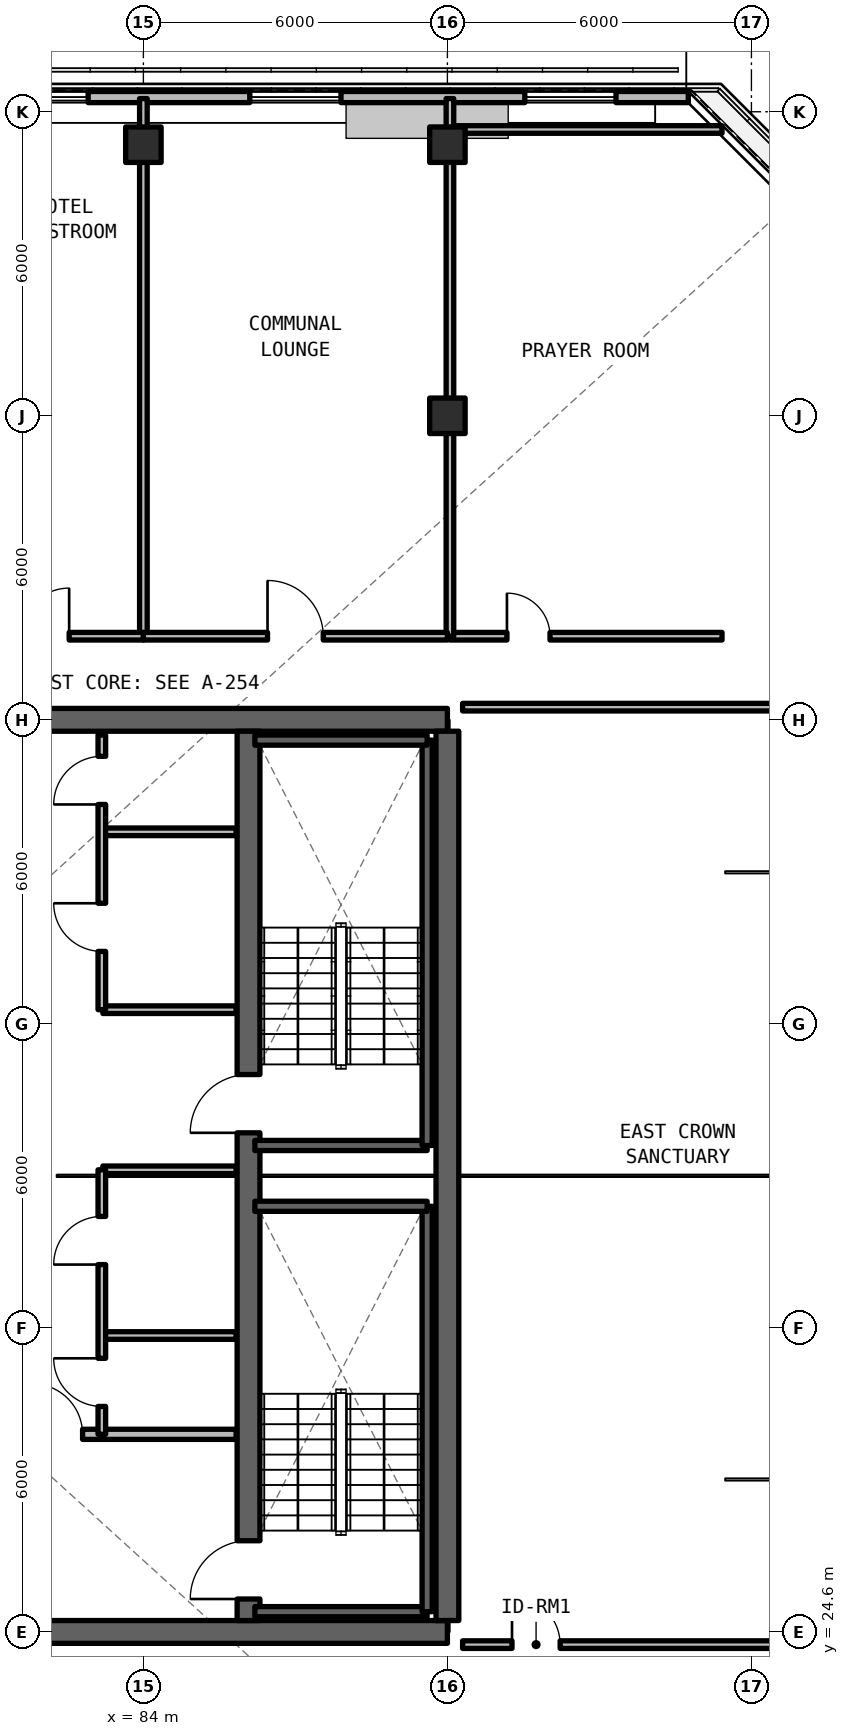
"""IFC4 building model, lengths in metres.
Left out: names, types, materials, properties, quantities, classifications, styles, units other than length and angle.
Written with IfcOpenShell. Run it as: python <this file> out.ifc"""

import sys

from ifc_helpers import new_model, si_unit, direction, frame, frame_2d, origin, origin_2d, place, context, subcontext, project, spatial, rectangle, extrude, element, fill, save


model = new_model("IFC4")
c1 = context("Model", 3, precision=1e-05, world=origin(), true_north=direction((0.0, 1.0)))
c2 = subcontext(c1, "Body", "Model", "MODEL_VIEW")
j1 = project(units=[si_unit("LENGTHUNIT", "METRE"), si_unit("PLANEANGLEUNIT", "RADIAN")], contexts=[c1])
p1 = place(None, origin())
s1 = spatial("IfcSite", under=j1, at=p1, CompositionType="ELEMENT")
p2 = place(p1, origin())
s2 = spatial("IfcBuilding", under=s1, at=p2, CompositionType="ELEMENT")
p3 = place(p2, frame((0.0, 0.0, 229.35)))
s3 = spatial("IfcBuildingStorey", under=s2, at=p3, CompositionType="ELEMENT", Elevation=229.35)
for number, where, z_axis, x_axis in (
    (1, (78.0, 24.6, 0.0), (0.0, 0.0, 1.0), (1.0, 0.0, 0.0)),
    (2, (90.0, 42.6, 0.0), (0.0, 0.0, 1.0), (-1.0, 0.0, 0.0)),
):
    element("IfcWall", number, at=place(p3, frame(where, z_axis=z_axis, x_axis=x_axis)), inside=s3, PredefinedType="SHEAR", context=c2, shape_type="SweptSolid", body=[
        extrude(rectangle(XDim=12.0, YDim=0.45, at=frame_2d((6.0, 0.0))), origin(), (0.0, 0.0, 1.0), 3.3),
    ])
p4 = place(p3, frame((90.0, 24.825, 0.0), z_axis=(0.0, 0.0, 1.0), x_axis=(0.0, 1.0, 0.0)))
e3 = element("IfcWall", 3, at=p4, inside=s3, PredefinedType="SHEAR", context=c2, shape_type="SweptSolid", body=[
    extrude(rectangle(XDim=17.55, YDim=0.45, at=frame_2d((8.775, 0.0))), origin(), (0.0, 0.0, 1.0), 3.3),
])
p5 = place(p3, frame((86.075, 24.825, 0.0), z_axis=(0.0, 0.0, 1.0), x_axis=(0.0, 1.0, 0.0)))
e4 = element("IfcWall", 4, at=p5, inside=s3, PredefinedType="SHEAR", context=c2, shape_type="SweptSolid", body=[
    extrude(rectangle(XDim=17.55, YDim=0.45, at=frame_2d((8.775, 0.0))), origin(), (0.0, 0.0, 1.0), 3.3),
])
p6 = place(p5, frame((0.425, 0.0, 0.0)))
e5 = element("IfcOpeningElement", 5, at=p6, cuts=e4, PredefinedType="OPENING", context=c2, shape_type="SweptSolid", body=[
    extrude(rectangle(XDim=1.15, YDim=2.15, at=frame_2d((0.575, 1.075))), frame((0.0, 0.235, 0.0), z_axis=(0.0, -1.0, 0.0), x_axis=(1.0, 0.0, 0.0)), (0.0, 0.0, 1.0), 0.47),
])
p7 = place(p5, frame((9.625, 0.0, 0.0)))
e6 = element("IfcOpeningElement", 6, at=p7, cuts=e4, PredefinedType="OPENING", context=c2, shape_type="SweptSolid", body=[
    extrude(rectangle(XDim=1.15, YDim=2.15, at=frame_2d((0.575, 1.075))), frame((0.0, 0.235, 0.0), z_axis=(0.0, -1.0, 0.0), x_axis=(1.0, 0.0, 0.0)), (0.0, 0.0, 1.0), 0.47),
])
for number, where, z_axis, x_axis in (
    (7, (90.0, 48.6, 0.0), (0.0, 0.0, 1.0), (1.0, 0.0, 0.0)),
    (8, (84.0, 53.95, 0.0), (0.0, 0.0, 1.0), (1.0, 0.0, 0.0)),
    (9, (90.0, 53.95, 0.0), (0.0, 0.0, 1.0), (1.0, 0.0, 0.0)),
):
    element("IfcColumn", number, at=place(p3, frame(where, z_axis=z_axis, x_axis=x_axis)), inside=s3, PredefinedType="COLUMN", context=c2, shape_type="SweptSolid", body=[
        extrude(rectangle(XDim=0.7, YDim=0.7, at=origin_2d()), origin(), (0.0, 0.0, 1.0), 3.3),
    ])
p8 = place(p3, frame((94.754, 54.89, 0.0), z_axis=(0.0, 0.0, 1.0), x_axis=(-1.0, 0.0, 0.0)))
e10 = element("IfcWall", 10, at=p8, inside=s3, PredefinedType="SOLIDWALL", context=c2, shape_type="SweptSolid", body=[
    extrude(rectangle(XDim=23.609, YDim=0.22, at=frame_2d((11.804, 0.0))), origin(), (0.0, 0.0, 1.0), 3.08),
])
p9 = place(p8, frame((1.427, 0.0, 0.78)))
e11 = element("IfcOpeningElement", 11, at=p9, cuts=e10, PredefinedType="OPENING", context=c2, shape_type="SweptSolid", body=[
    extrude(rectangle(XDim=1.8, YDim=1.66, at=frame_2d((0.9, 0.83))), frame((0.0, 0.12, 0.0), z_axis=(0.0, -1.0, 0.0), x_axis=(1.0, 0.0, 0.0)), (0.0, 0.0, 1.0), 0.24),
])
p10 = place(p8, frame((18.854, 0.0, 0.78)))
e12 = element("IfcOpeningElement", 12, at=p10, cuts=e10, PredefinedType="OPENING", context=c2, shape_type="SweptSolid", body=[
    extrude(rectangle(XDim=1.8, YDim=1.66, at=frame_2d((0.9, 0.83))), frame((0.0, 0.12, 0.0), z_axis=(0.0, -1.0, 0.0), x_axis=(1.0, 0.0, 0.0)), (0.0, 0.0, 1.0), 0.24),
])
p11 = place(p8, frame((15.299, 0.0, 0.78)))
e13 = element("IfcOpeningElement", 13, at=p11, cuts=e10, PredefinedType="OPENING", context=c2, shape_type="SweptSolid", body=[
    extrude(rectangle(XDim=0.85, YDim=1.65, at=frame_2d((0.425, 0.825))), frame((0.0, 0.12, 0.0), z_axis=(0.0, -1.0, 0.0), x_axis=(1.0, 0.0, 0.0)), (0.0, 0.0, 1.0), 0.24),
])
p12 = place(p8, frame((11.844, 0.0, 0.78)))
e14 = element("IfcOpeningElement", 14, at=p12, cuts=e10, PredefinedType="OPENING", context=c2, shape_type="SweptSolid", body=[
    extrude(rectangle(XDim=1.8, YDim=1.66, at=frame_2d((0.9, 0.83))), frame((0.0, 0.12, 0.0), z_axis=(0.0, -1.0, 0.0), x_axis=(1.0, 0.0, 0.0)), (0.0, 0.0, 1.0), 0.24),
])
p13 = place(p8, frame((6.854, 0.0, 0.78)))
e15 = element("IfcOpeningElement", 15, at=p13, cuts=e10, PredefinedType="OPENING", context=c2, shape_type="SweptSolid", body=[
    extrude(rectangle(XDim=1.8, YDim=1.66, at=frame_2d((0.9, 0.83))), frame((0.0, 0.12, 0.0), z_axis=(0.0, -1.0, 0.0), x_axis=(1.0, 0.0, 0.0)), (0.0, 0.0, 1.0), 0.24),
])
p14 = place(p3, frame((78.245, 28.5, 0.0), z_axis=(0.0, 0.0, 1.0), x_axis=(1.0, 0.0, 0.0)))
e16 = element("IfcWall", 16, at=p14, inside=s3, PredefinedType="SOLIDWALL", context=c2, shape_type="SweptSolid", body=[
    extrude(rectangle(XDim=7.585, YDim=0.2, at=frame_2d((3.792, 0.0))), origin(), (0.0, 0.0, 1.0), 2.35),
])
p15 = place(p14, frame((3.555, 0.0, 0.0)))
e17 = element("IfcOpeningElement", 17, at=p15, cuts=e16, PredefinedType="OPENING", context=c2, shape_type="SweptSolid", body=[
    extrude(rectangle(XDim=1.0, YDim=2.15, at=frame_2d((0.5, 1.075))), frame((0.0, 0.11, 0.0), z_axis=(0.0, -1.0, 0.0), x_axis=(1.0, 0.0, 0.0)), (0.0, 0.0, 1.0), 0.22),
])
for number, where, z_axis, x_axis in (
    (18, (83.2, 30.45, 0.0), (0.0, 0.0, 1.0), (1.0, 0.0, 0.0)),
    (19, (83.2, 33.72, 0.0), (0.0, 0.0, 1.0), (1.0, 0.0, 0.0)),
):
    element("IfcWall", number, at=place(p3, frame(where, z_axis=z_axis, x_axis=x_axis)), inside=s3, PredefinedType="SOLIDWALL", context=c2, shape_type="SweptSolid", body=[
        extrude(rectangle(XDim=2.63, YDim=0.15, at=frame_2d((1.315, 0.0))), origin(), (0.0, 0.0, 1.0), 2.35),
    ])
p16 = place(p3, frame((83.18, 28.5, 0.0), z_axis=(0.0, 0.0, 1.0), x_axis=(0.0, 1.0, 0.0)))
e20 = element("IfcWall", 20, at=p16, inside=s3, PredefinedType="SOLIDWALL", context=c2, shape_type="SweptSolid", body=[
    extrude(rectangle(XDim=5.22, YDim=0.15, at=frame_2d((2.61, 0.0))), origin(), (0.0, 0.0, 1.0), 2.35),
])
p17 = place(p16, frame((0.55, 0.0, 0.0)))
e21 = element("IfcOpeningElement", 21, at=p17, cuts=e20, PredefinedType="OPENING", context=c2, shape_type="SweptSolid", body=[
    extrude(rectangle(XDim=0.95, YDim=2.15, at=frame_2d((0.475, 1.075))), frame((0.0, 0.085, 0.0), z_axis=(0.0, -1.0, 0.0), x_axis=(1.0, 0.0, 0.0)), (0.0, 0.0, 1.0), 0.17),
])
p18 = place(p16, frame((3.35, 0.0, 0.0)))
e22 = element("IfcOpeningElement", 22, at=p18, cuts=e20, PredefinedType="OPENING", context=c2, shape_type="SweptSolid", body=[
    extrude(rectangle(XDim=0.95, YDim=2.15, at=frame_2d((0.475, 1.075))), frame((0.0, 0.085, 0.0), z_axis=(0.0, -1.0, 0.0), x_axis=(1.0, 0.0, 0.0)), (0.0, 0.0, 1.0), 0.17),
])
for number, where, z_axis, x_axis in (
    (23, (83.2, 36.88, 0.0), (0.0, 0.0, 1.0), (1.0, 0.0, 0.0)),
    (24, (83.2, 40.39, 0.0), (0.0, 0.0, 1.0), (1.0, 0.0, 0.0)),
):
    element("IfcWall", number, at=place(p3, frame(where, z_axis=z_axis, x_axis=x_axis)), inside=s3, PredefinedType="SOLIDWALL", context=c2, shape_type="SweptSolid", body=[
        extrude(rectangle(XDim=2.63, YDim=0.15, at=frame_2d((1.315, 0.0))), origin(), (0.0, 0.0, 1.0), 2.35),
    ])
p19 = place(p3, frame((83.18, 36.88, 0.0), z_axis=(0.0, 0.0, 1.0), x_axis=(0.0, 1.0, 0.0)))
e25 = element("IfcWall", 25, at=p19, inside=s3, PredefinedType="SOLIDWALL", context=c2, shape_type="SweptSolid", body=[
    extrude(rectangle(XDim=5.42, YDim=0.15, at=frame_2d((2.71, 0.0))), origin(), (0.0, 0.0, 1.0), 2.35),
])
p20 = place(p19, frame((1.15, 0.0, 0.0)))
e26 = element("IfcOpeningElement", 26, at=p20, cuts=e25, PredefinedType="OPENING", context=c2, shape_type="SweptSolid", body=[
    extrude(rectangle(XDim=0.95, YDim=2.15, at=frame_2d((0.475, 1.075))), frame((0.0, 0.085, 0.0), z_axis=(0.0, -1.0, 0.0), x_axis=(1.0, 0.0, 0.0)), (0.0, 0.0, 1.0), 0.17),
])
p21 = place(p19, frame((4.05, 0.0, 0.0)))
e27 = element("IfcOpeningElement", 27, at=p21, cuts=e25, PredefinedType="OPENING", context=c2, shape_type="SweptSolid", body=[
    extrude(rectangle(XDim=0.95, YDim=2.15, at=frame_2d((0.475, 1.075))), frame((0.0, 0.085, 0.0), z_axis=(0.0, -1.0, 0.0), x_axis=(1.0, 0.0, 0.0)), (0.0, 0.0, 1.0), 0.17),
])
p22 = place(p3, frame((90.3, 24.35, 0.0), z_axis=(0.0, 0.0, 1.0), x_axis=(1.0, 0.0, 0.0)))
e28 = element("IfcWall", 28, at=p22, inside=s3, PredefinedType="SOLIDWALL", context=c2, shape_type="SweptSolid", body=[
    extrude(rectangle(XDim=8.52, YDim=0.15, at=frame_2d((4.26, 0.0))), origin(), (0.0, 0.0, 1.0), 2.35),
])
p23 = place(p22, frame((0.975, 0.0, 0.0)))
e29 = element("IfcOpeningElement", 29, at=p23, cuts=e28, PredefinedType="OPENING", context=c2, shape_type="SweptSolid", body=[
    extrude(rectangle(XDim=0.95, YDim=2.15, at=frame_2d((0.475, 1.075))), frame((0.0, 0.085, 0.0), z_axis=(0.0, -1.0, 0.0), x_axis=(1.0, 0.0, 0.0)), (0.0, 0.0, 1.0), 0.17),
])
p24 = place(p3, frame((90.3, 42.85, 0.0), z_axis=(0.0, 0.0, 1.0), x_axis=(1.0, 0.0, 0.0)))
e30 = element("IfcWall", 30, at=p24, inside=s3, PredefinedType="SOLIDWALL", context=c2, shape_type="SweptSolid", body=[
    extrude(rectangle(XDim=8.52, YDim=0.15, at=frame_2d((4.26, 0.0))), origin(), (0.0, 0.0, 1.0), 2.35),
])
p25 = place(p3, frame((90.05, 44.25, 0.0), z_axis=(0.0, 0.0, 1.0), x_axis=(1.0, 0.0, 0.0)))
e31 = element("IfcWall", 31, at=p25, inside=s3, PredefinedType="SOLIDWALL", context=c2, shape_type="SweptSolid", body=[
    extrude(rectangle(XDim=5.37, YDim=0.15, at=frame_2d((2.685, 0.0))), origin(), (0.0, 0.0, 1.0), 2.35),
])
p26 = place(p25, frame((1.125, 0.0, 0.0)))
e32 = element("IfcOpeningElement", 32, at=p26, cuts=e31, PredefinedType="OPENING", context=c2, shape_type="SweptSolid", body=[
    extrude(rectangle(XDim=0.85, YDim=2.1, at=frame_2d((0.425, 1.05))), frame((0.0, 0.085, 0.0), z_axis=(0.0, -1.0, 0.0), x_axis=(1.0, 0.0, 0.0)), (0.0, 0.0, 1.0), 0.17),
])
p27 = place(p3, frame((90.05, 54.25, 0.0), z_axis=(0.0, 0.0, 1.0), x_axis=(1.0, 0.0, 0.0)))
e33 = element("IfcWall", 33, at=p27, inside=s3, PredefinedType="SOLIDWALL", context=c2, shape_type="SweptSolid", body=[
    extrude(rectangle(XDim=5.37, YDim=0.15, at=frame_2d((2.685, 0.0))), origin(), (0.0, 0.0, 1.0), 2.35),
])
for number, where, z_axis, x_axis in (
    (34, (90.05, 44.25, 0.0), (0.0, 0.0, 1.0), (0.0, 1.0, 0.0)),
    (35, (84.0, 44.25, 0.0), (0.0, 0.0, 1.0), (0.0, 1.0, 0.0)),
):
    element("IfcWall", number, at=place(p3, frame(where, z_axis=z_axis, x_axis=x_axis)), inside=s3, PredefinedType="SOLIDWALL", context=c2, shape_type="SweptSolid", body=[
        extrude(rectangle(XDim=10.61, YDim=0.15, at=frame_2d((5.305, 0.0))), origin(), (0.0, 0.0, 1.0), 2.35),
    ])
p28 = place(p3, frame((78.0, 44.25, 0.0), z_axis=(0.0, 0.0, 1.0), x_axis=(1.0, 0.0, 0.0)))
e36 = element("IfcWall", 36, at=p28, inside=s3, PredefinedType="SOLIDWALL", context=c2, shape_type="SweptSolid", body=[
    extrude(rectangle(XDim=6.0, YDim=0.15, at=frame_2d((3.0, 0.0))), origin(), (0.0, 0.0, 1.0), 2.35),
])
p29 = place(p28, frame((3.585, 0.0, 0.0)))
e37 = element("IfcOpeningElement", 37, at=p29, cuts=e36, PredefinedType="OPENING", context=c2, shape_type="SweptSolid", body=[
    extrude(rectangle(XDim=0.95, YDim=2.15, at=frame_2d((0.475, 1.075))), frame((0.0, 0.085, 0.0), z_axis=(0.0, -1.0, 0.0), x_axis=(1.0, 0.0, 0.0)), (0.0, 0.0, 1.0), 0.17),
])
p30 = place(p3, frame((84.0, 44.25, 0.0), z_axis=(0.0, 0.0, 1.0), x_axis=(1.0, 0.0, 0.0)))
e38 = element("IfcWall", 38, at=p30, inside=s3, PredefinedType="SOLIDWALL", context=c2, shape_type="SweptSolid", body=[
    extrude(rectangle(XDim=6.0, YDim=0.15, at=frame_2d((3.0, 0.0))), origin(), (0.0, 0.0, 1.0), 2.35),
])
p31 = place(p30, frame((2.45, 0.0, 0.0)))
e39 = element("IfcOpeningElement", 39, at=p31, cuts=e38, PredefinedType="OPENING", context=c2, shape_type="SweptSolid", body=[
    extrude(rectangle(XDim=1.1, YDim=2.15, at=frame_2d((0.55, 1.075))), frame((0.0, 0.085, 0.0), z_axis=(0.0, -1.0, 0.0), x_axis=(1.0, 0.0, 0.0)), (0.0, 0.0, 1.0), 0.17),
])
p32 = place(p3, frame((86.2, 25.0, 0.0), z_axis=(0.0, 0.0, 1.0), x_axis=(1.0, 0.0, 0.0)))
e40 = element("IfcWall", 40, at=p32, inside=s3, PredefinedType="SOLIDWALL", context=c2, shape_type="SweptSolid", body=[
    extrude(rectangle(XDim=3.4, YDim=0.2, at=frame_2d((1.7, 0.0))), origin(), (0.0, 0.0, 1.0), 3.3),
])
p33 = place(p3, frame((89.6, 25.0, 0.0), z_axis=(0.0, 0.0, 1.0), x_axis=(0.0, 1.0, 0.0)))
e41 = element("IfcWall", 41, at=p33, inside=s3, PredefinedType="SOLIDWALL", context=c2, shape_type="SweptSolid", body=[
    extrude(rectangle(XDim=8.0, YDim=0.2, at=frame_2d((4.0, 0.0))), origin(), (0.0, 0.0, 1.0), 3.3),
])
for number, where, z_axis, x_axis in (
    (42, (89.6, 33.0, 0.0), (0.0, 0.0, 1.0), (-1.0, 0.0, 0.0)),
    (43, (86.2, 34.2, 0.0), (0.0, 0.0, 1.0), (1.0, 0.0, 0.0)),
):
    element("IfcWall", number, at=place(p3, frame(where, z_axis=z_axis, x_axis=x_axis)), inside=s3, PredefinedType="SOLIDWALL", context=c2, shape_type="SweptSolid", body=[
        extrude(rectangle(XDim=3.4, YDim=0.2, at=frame_2d((1.7, 0.0))), origin(), (0.0, 0.0, 1.0), 3.3),
    ])
p34 = place(p3, frame((89.6, 34.2, 0.0), z_axis=(0.0, 0.0, 1.0), x_axis=(0.0, 1.0, 0.0)))
e44 = element("IfcWall", 44, at=p34, inside=s3, PredefinedType="SOLIDWALL", context=c2, shape_type="SweptSolid", body=[
    extrude(rectangle(XDim=8.0, YDim=0.2, at=frame_2d((4.0, 0.0))), origin(), (0.0, 0.0, 1.0), 3.3),
])
p35 = place(p3, frame((89.6, 42.2, 0.0), z_axis=(0.0, 0.0, 1.0), x_axis=(-1.0, 0.0, 0.0)))
e45 = element("IfcWall", 45, at=p35, inside=s3, PredefinedType="SOLIDWALL", context=c2, shape_type="SweptSolid", body=[
    extrude(rectangle(XDim=3.4, YDim=0.2, at=frame_2d((1.7, 0.0))), origin(), (0.0, 0.0, 1.0), 3.3),
])
p36 = place(p9, origin())
e46 = element("IfcWindow", 46, at=p36, inside=s3, PartitioningType="SINGLE_PANEL", PredefinedType="WINDOW", context=c2, shape_type="SweptSolid", body=[
    extrude(rectangle(XDim=1.8, YDim=1.66, at=frame_2d((0.9, 0.83))), frame((0.0, 0.03, 0.0), z_axis=(0.0, -1.0, 0.0), x_axis=(1.0, 0.0, 0.0)), (0.0, 0.0, 1.0), 0.06),
])
fill(e11, e46)
p37 = place(p12, origin())
e47 = element("IfcWindow", 47, at=p37, inside=s3, PartitioningType="SINGLE_PANEL", PredefinedType="WINDOW", context=c2, shape_type="SweptSolid", body=[
    extrude(rectangle(XDim=1.8, YDim=1.66, at=frame_2d((0.9, 0.83))), frame((0.0, 0.03, 0.0), z_axis=(0.0, -1.0, 0.0), x_axis=(1.0, 0.0, 0.0)), (0.0, 0.0, 1.0), 0.06),
])
fill(e14, e47)
p38 = place(p13, origin())
e48 = element("IfcWindow", 48, at=p38, inside=s3, PartitioningType="SINGLE_PANEL", PredefinedType="WINDOW", context=c2, shape_type="SweptSolid", body=[
    extrude(rectangle(XDim=1.8, YDim=1.66, at=frame_2d((0.9, 0.83))), frame((0.0, 0.03, 0.0), z_axis=(0.0, -1.0, 0.0), x_axis=(1.0, 0.0, 0.0)), (0.0, 0.0, 1.0), 0.06),
])
fill(e15, e48)
p39 = place(p15, origin())
e49 = element("IfcDoor", 49, at=p39, inside=s3, OperationType="SINGLE_SWING_LEFT", PredefinedType="DOOR", context=c2, shape_type="SweptSolid", body=[
    extrude(rectangle(XDim=1.0, YDim=2.15, at=frame_2d((0.5, 1.075))), frame((0.0, 0.025, 0.0), z_axis=(0.0, -1.0, 0.0), x_axis=(1.0, 0.0, 0.0)), (0.0, 0.0, 1.0), 0.05),
])
fill(e17, e49)
p40 = place(p17, origin())
e50 = element("IfcDoor", 50, at=p40, inside=s3, OperationType="SINGLE_SWING_RIGHT", PredefinedType="DOOR", context=c2, shape_type="SweptSolid", body=[
    extrude(rectangle(XDim=0.95, YDim=2.15, at=frame_2d((0.475, 1.075))), frame((0.0, 0.025, 0.0), z_axis=(0.0, -1.0, 0.0), x_axis=(1.0, 0.0, 0.0)), (0.0, 0.0, 1.0), 0.05),
])
fill(e21, e50)
p41 = place(p18, origin())
e51 = element("IfcDoor", 51, at=p41, inside=s3, OperationType="SINGLE_SWING_LEFT", PredefinedType="DOOR", context=c2, shape_type="SweptSolid", body=[
    extrude(rectangle(XDim=0.95, YDim=2.15, at=frame_2d((0.475, 1.075))), frame((0.0, 0.025, 0.0), z_axis=(0.0, -1.0, 0.0), x_axis=(1.0, 0.0, 0.0)), (0.0, 0.0, 1.0), 0.05),
])
fill(e22, e51)
p42 = place(p20, origin())
e52 = element("IfcDoor", 52, at=p42, inside=s3, OperationType="SINGLE_SWING_RIGHT", PredefinedType="DOOR", context=c2, shape_type="SweptSolid", body=[
    extrude(rectangle(XDim=0.95, YDim=2.15, at=frame_2d((0.475, 1.075))), frame((0.0, 0.025, 0.0), z_axis=(0.0, -1.0, 0.0), x_axis=(1.0, 0.0, 0.0)), (0.0, 0.0, 1.0), 0.05),
])
fill(e26, e52)
p43 = place(p21, origin())
e53 = element("IfcDoor", 53, at=p43, inside=s3, OperationType="SINGLE_SWING_LEFT", PredefinedType="DOOR", context=c2, shape_type="SweptSolid", body=[
    extrude(rectangle(XDim=0.95, YDim=2.15, at=frame_2d((0.475, 1.075))), frame((0.0, 0.025, 0.0), z_axis=(0.0, -1.0, 0.0), x_axis=(1.0, 0.0, 0.0)), (0.0, 0.0, 1.0), 0.05),
])
fill(e27, e53)
p44 = place(p23, origin())
e54 = element("IfcDoor", 54, at=p44, inside=s3, OperationType="SINGLE_SWING_LEFT", PredefinedType="DOOR", context=c2, shape_type="SweptSolid", body=[
    extrude(rectangle(XDim=0.95, YDim=2.15, at=frame_2d((0.475, 1.075))), frame((0.0, 0.025, 0.0), z_axis=(0.0, -1.0, 0.0), x_axis=(1.0, 0.0, 0.0)), (0.0, 0.0, 1.0), 0.05),
])
fill(e29, e54)
p45 = place(p26, origin())
e55 = element("IfcDoor", 55, at=p45, inside=s3, OperationType="SINGLE_SWING_LEFT", PredefinedType="DOOR", context=c2, shape_type="SweptSolid", body=[
    extrude(rectangle(XDim=0.85, YDim=2.1, at=frame_2d((0.425, 1.05))), frame((0.0, 0.025, 0.0), z_axis=(0.0, -1.0, 0.0), x_axis=(1.0, 0.0, 0.0)), (0.0, 0.0, 1.0), 0.05),
])
fill(e32, e55)
p46 = place(p29, origin())
e56 = element("IfcDoor", 56, at=p46, inside=s3, OperationType="SINGLE_SWING_RIGHT", PredefinedType="DOOR", context=c2, shape_type="SweptSolid", body=[
    extrude(rectangle(XDim=0.95, YDim=2.15, at=frame_2d((0.475, 1.075))), frame((0.0, 0.025, 0.0), z_axis=(0.0, -1.0, 0.0), x_axis=(1.0, 0.0, 0.0)), (0.0, 0.0, 1.0), 0.05),
])
fill(e37, e56)
p47 = place(p31, origin())
e57 = element("IfcDoor", 57, at=p47, inside=s3, OperationType="SINGLE_SWING_LEFT", PredefinedType="DOOR", context=c2, shape_type="SweptSolid", body=[
    extrude(rectangle(XDim=1.1, YDim=2.15, at=frame_2d((0.55, 1.075))), frame((0.0, 0.025, 0.0), z_axis=(0.0, -1.0, 0.0), x_axis=(1.0, 0.0, 0.0)), (0.0, 0.0, 1.0), 0.05),
])
fill(e39, e57)
p48 = place(p6, origin())
e58 = element("IfcDoor", 58, at=p48, inside=s3, OperationType="SINGLE_SWING_LEFT", PredefinedType="DOOR", context=c2, shape_type="SweptSolid", body=[
    extrude(rectangle(XDim=1.15, YDim=2.15, at=frame_2d((0.575, 1.075))), frame((0.0, 0.025, 0.0), z_axis=(0.0, -1.0, 0.0), x_axis=(1.0, 0.0, 0.0)), (0.0, 0.0, 1.0), 0.05),
])
fill(e5, e58)
p49 = place(p7, origin())
e59 = element("IfcDoor", 59, at=p49, inside=s3, OperationType="SINGLE_SWING_RIGHT", PredefinedType="DOOR", context=c2, shape_type="SweptSolid", body=[
    extrude(rectangle(XDim=1.15, YDim=2.15, at=frame_2d((0.575, 1.075))), frame((0.0, 0.025, 0.0), z_axis=(0.0, -1.0, 0.0), x_axis=(1.0, 0.0, 0.0)), (0.0, 0.0, 1.0), 0.05),
])
fill(e6, e59)
save(model, sys.argv[1])
